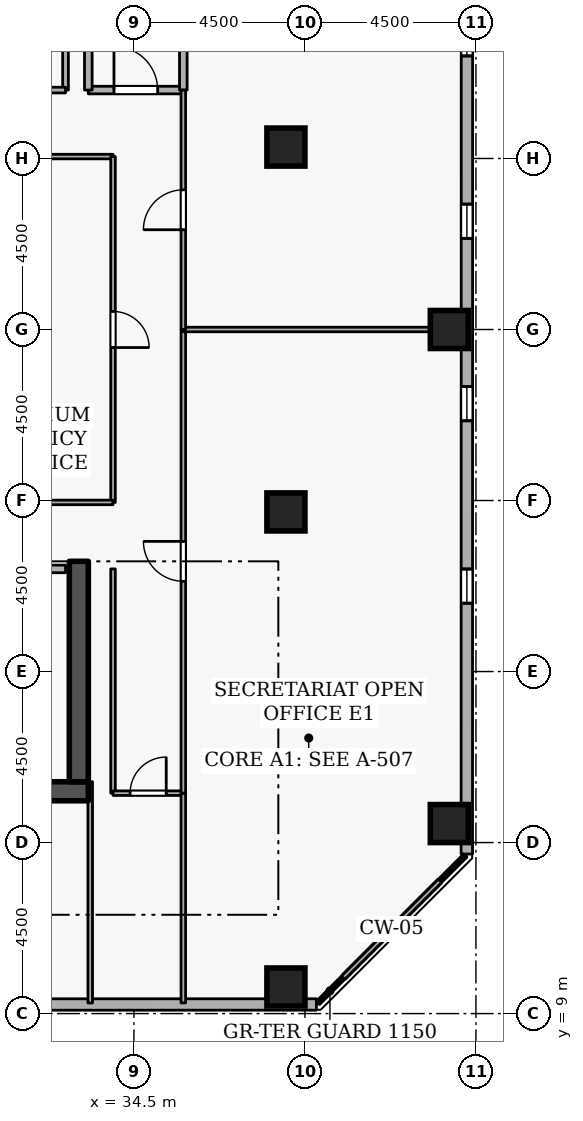
"""IFC4 building model, lengths in metres.
Left out: names, types, materials, properties, quantities, classifications, styles, units other than length and angle.
Written with IfcOpenShell. Run it as: python <this file> out.ifc"""

import sys

from ifc_helpers import new_model, si_unit, direction, frame, frame_2d, origin, origin_2d, place, context, subcontext, project, spatial, rectangle, extrude, element, fill, save


model = new_model("IFC4")
c1 = context("Model", 3, precision=1e-05, world=origin(), true_north=direction((0.0, 1.0)))
c2 = subcontext(c1, "Body", "Model", "MODEL_VIEW")
j1 = project(units=[si_unit("LENGTHUNIT", "METRE"), si_unit("PLANEANGLEUNIT", "RADIAN")], contexts=[c1])
p1 = place(None, origin())
s1 = spatial("IfcSite", under=j1, at=p1, CompositionType="ELEMENT")
p2 = place(p1, origin())
s2 = spatial("IfcBuilding", under=s1, at=p2, CompositionType="ELEMENT")
p3 = place(p2, frame((0.0, 0.0, 203.7)))
s3 = spatial("IfcBuildingStorey", under=s2, at=p3, CompositionType="ELEMENT", Elevation=203.7)
p4 = place(p3, frame((17.7, 14.85, 0.0), z_axis=(0.0, 0.0, 1.0), x_axis=(1.0, 0.0, 0.0)))
e1 = element("IfcWall", 1, at=p4, inside=s3, PredefinedType="SHEAR", context=c2, shape_type="SweptSolid", body=[
    extrude(rectangle(XDim=15.6, YDim=0.5, at=frame_2d((7.8, 0.0))), origin(), (0.0, 0.0, 1.0), 3.6),
])
p5 = place(p3, frame((33.05, 15.1, 0.0), z_axis=(0.0, 0.0, 1.0), x_axis=(0.0, 1.0, 0.0)))
e2 = element("IfcWall", 2, at=p5, inside=s3, PredefinedType="SHEAR", context=c2, shape_type="SweptSolid", body=[
    extrude(rectangle(XDim=5.8, YDim=0.5, at=frame_2d((2.9, 0.0))), origin(), (0.0, 0.0, 1.0), 3.6),
])
for number, where, z_axis, x_axis in (
    (3, (38.5, 9.7, 0.0), (0.0, 0.0, 1.0), (1.0, 0.0, 0.0)),
    (4, (42.8, 14.0, 0.0), (0.0, 0.0, 1.0), (1.0, 0.0, 0.0)),
    (5, (42.8, 27.0, 0.0), (0.0, 0.0, 1.0), (1.0, 0.0, 0.0)),
    (6, (38.5, 22.2, 0.0), (0.0, 0.0, 1.0), (1.0, 0.0, 0.0)),
    (7, (38.5, 31.8, 0.0), (0.0, 0.0, 1.0), (1.0, 0.0, 0.0)),
):
    element("IfcColumn", number, at=place(p3, frame(where, z_axis=z_axis, x_axis=x_axis)), inside=s3, PredefinedType="COLUMN", context=c2, shape_type="SweptSolid", body=[
        extrude(rectangle(XDim=1.0, YDim=1.0, at=origin_2d()), origin(), (0.0, 0.0, 1.0), 3.6),
    ])
p6 = place(p3, frame((4.319, 9.235, 0.0), z_axis=(0.0, 0.0, 1.0), x_axis=(0.999999991209, 0.000132597301, 0.0)))
e8 = element("IfcWall", 8, at=p6, inside=s3, PredefinedType="STANDARD", context=c2, shape_type="SweptSolid", body=[
    extrude(rectangle(XDim=34.983, YDim=0.3, at=frame_2d((17.492, 0.0))), origin(), (0.0, 0.0, 1.0), 2.7),
])
p7 = place(p6, frame((1.8, 0.0, 0.72)))
e9 = element("IfcOpeningElement", 9, at=p7, cuts=e8, PredefinedType="OPENING", context=c2, shape_type="SweptSolid", body=[
    extrude(rectangle(XDim=0.9, YDim=1.75, at=frame_2d((0.45, 0.875))), frame((0.0, 0.16, 0.0), z_axis=(0.0, -1.0, 0.0), x_axis=(1.0, 0.0, 0.0)), (0.0, 0.0, 1.0), 0.32),
])
p8 = place(p6, frame((11.4, 0.0, 0.72)))
e10 = element("IfcOpeningElement", 10, at=p8, cuts=e8, PredefinedType="OPENING", context=c2, shape_type="SweptSolid", body=[
    extrude(rectangle(XDim=0.9, YDim=1.75, at=frame_2d((0.45, 0.875))), frame((0.0, 0.16, 0.0), z_axis=(0.0, -1.0, 0.0), x_axis=(1.0, 0.0, 0.0)), (0.0, 0.0, 1.0), 0.32),
])
p9 = place(p6, frame((16.2, 0.0, 0.72)))
e11 = element("IfcOpeningElement", 11, at=p9, cuts=e8, PredefinedType="OPENING", context=c2, shape_type="SweptSolid", body=[
    extrude(rectangle(XDim=0.9, YDim=1.75, at=frame_2d((0.45, 0.875))), frame((0.0, 0.16, 0.0), z_axis=(0.0, -1.0, 0.0), x_axis=(1.0, 0.0, 0.0)), (0.0, 0.0, 1.0), 0.32),
])
p10 = place(p6, frame((25.8, 0.0, 0.72)))
e12 = element("IfcOpeningElement", 12, at=p10, cuts=e8, PredefinedType="OPENING", context=c2, shape_type="SweptSolid", body=[
    extrude(rectangle(XDim=0.9, YDim=1.75, at=frame_2d((0.45, 0.875))), frame((0.0, 0.16, 0.0), z_axis=(0.0, -1.0, 0.0), x_axis=(1.0, 0.0, 0.0)), (0.0, 0.0, 1.0), 0.32),
])
p11 = place(p3, frame((43.26, 13.198, 0.0), z_axis=(0.0, 0.0, 1.0), x_axis=(0.000132597301, 0.999999991209, 0.0)))
e13 = element("IfcWall", 13, at=p11, inside=s3, PredefinedType="STANDARD", context=c2, shape_type="SweptSolid", body=[
    extrude(rectangle(XDim=34.983, YDim=0.3, at=frame_2d((17.492, 0.0))), origin(), (0.0, 0.0, 1.0), 2.7),
])
p12 = place(p11, frame((6.6, 0.0, 0.72)))
e14 = element("IfcOpeningElement", 14, at=p12, cuts=e13, PredefinedType="OPENING", context=c2, shape_type="SweptSolid", body=[
    extrude(rectangle(XDim=0.9, YDim=1.75, at=frame_2d((0.45, 0.875))), frame((0.0, 0.16, 0.0), z_axis=(0.0, -1.0, 0.0), x_axis=(1.0, 0.0, 0.0)), (0.0, 0.0, 1.0), 0.32),
])
p13 = place(p11, frame((11.4, 0.0, 0.72)))
e15 = element("IfcOpeningElement", 15, at=p13, cuts=e13, PredefinedType="OPENING", context=c2, shape_type="SweptSolid", body=[
    extrude(rectangle(XDim=0.9, YDim=1.75, at=frame_2d((0.45, 0.875))), frame((0.0, 0.16, 0.0), z_axis=(0.0, -1.0, 0.0), x_axis=(1.0, 0.0, 0.0)), (0.0, 0.0, 1.0), 0.32),
])
p14 = place(p11, frame((16.2, 0.0, 0.72)))
e16 = element("IfcOpeningElement", 16, at=p14, cuts=e13, PredefinedType="OPENING", context=c2, shape_type="SweptSolid", body=[
    extrude(rectangle(XDim=0.9, YDim=1.75, at=frame_2d((0.45, 0.875))), frame((0.0, 0.16, 0.0), z_axis=(0.0, -1.0, 0.0), x_axis=(1.0, 0.0, 0.0)), (0.0, 0.0, 1.0), 0.32),
])
p15 = place(p11, frame((21.0, 0.0, 0.72)))
e17 = element("IfcOpeningElement", 17, at=p15, cuts=e13, PredefinedType="OPENING", context=c2, shape_type="SweptSolid", body=[
    extrude(rectangle(XDim=0.9, YDim=1.75, at=frame_2d((0.45, 0.875))), frame((0.0, 0.16, 0.0), z_axis=(0.0, -1.0, 0.0), x_axis=(1.0, 0.0, 0.0)), (0.0, 0.0, 1.0), 0.32),
])
p16 = place(p11, frame((30.6, 0.0, 0.72)))
e18 = element("IfcOpeningElement", 18, at=p16, cuts=e13, PredefinedType="OPENING", context=c2, shape_type="SweptSolid", body=[
    extrude(rectangle(XDim=0.9, YDim=1.75, at=frame_2d((0.45, 0.875))), frame((0.0, 0.16, 0.0), z_axis=(0.0, -1.0, 0.0), x_axis=(1.0, 0.0, 0.0)), (0.0, 0.0, 1.0), 0.32),
])
p17 = place(p3, frame((33.3, 33.3, 0.0), z_axis=(0.0, 0.0, 1.0), x_axis=(1.0, 0.0, 0.0)))
e19 = element("IfcWall", 19, at=p17, inside=s3, PredefinedType="STANDARD", context=c2, shape_type="SweptSolid", body=[
    extrude(rectangle(XDim=2.5, YDim=0.2, at=frame_2d((1.25, 0.0))), origin(), (0.0, 0.0, 1.0), 3.34),
])
p18 = place(p17, frame((0.675, 0.0, 0.0)))
e20 = element("IfcOpeningElement", 20, at=p18, cuts=e19, PredefinedType="OPENING", context=c2, shape_type="SweptSolid", body=[
    extrude(rectangle(XDim=1.15, YDim=2.1, at=frame_2d((0.575, 1.05))), frame((0.0, 0.11, 0.0), z_axis=(0.0, -1.0, 0.0), x_axis=(1.0, 0.0, 0.0)), (0.0, 0.0, 1.0), 0.22),
])
p19 = place(p3, frame((35.8, 33.3, 0.0), z_axis=(0.0, 0.0, 1.0), x_axis=(0.0, 1.0, 0.0)))
e21 = element("IfcWall", 21, at=p19, inside=s3, PredefinedType="STANDARD", context=c2, shape_type="SweptSolid", body=[
    extrude(rectangle(XDim=5.7, YDim=0.2, at=frame_2d((2.85, 0.0))), origin(), (0.0, 0.0, 1.0), 3.34),
])
p20 = place(p3, frame((33.3, 35.6, 0.0), z_axis=(0.0, 0.0, 1.0), x_axis=(0.0, -1.0, 0.0)))
e22 = element("IfcWall", 22, at=p20, inside=s3, PredefinedType="STANDARD", context=c2, shape_type="SweptSolid", body=[
    extrude(rectangle(XDim=2.3, YDim=0.2, at=frame_2d((1.15, 0.0))), origin(), (0.0, 0.0, 1.0), 2.545),
])
p21 = place(p3, frame((30.5, 20.7, 0.0), z_axis=(0.0, 0.0, 1.0), x_axis=(1.0, 0.0, 0.0)))
e23 = element("IfcWall", 23, at=p21, inside=s3, PredefinedType="STANDARD", context=c2, shape_type="SweptSolid", body=[
    extrude(rectangle(XDim=2.2, YDim=0.2, at=frame_2d((1.1, 0.0))), origin(), (0.0, 0.0, 1.0), 3.34),
])
p22 = place(p21, frame((0.525, 0.0, 0.0)))
e24 = element("IfcOpeningElement", 24, at=p22, cuts=e23, PredefinedType="OPENING", context=c2, shape_type="SweptSolid", body=[
    extrude(rectangle(XDim=1.15, YDim=2.1, at=frame_2d((0.575, 1.05))), frame((0.0, 0.11, 0.0), z_axis=(0.0, -1.0, 0.0), x_axis=(1.0, 0.0, 0.0)), (0.0, 0.0, 1.0), 0.22),
])
p23 = place(p3, frame((32.7, 35.35, 0.0), z_axis=(0.0, 0.0, 1.0), x_axis=(0.0, -1.0, 0.0)))
e25 = element("IfcWall", 25, at=p23, inside=s3, PredefinedType="PARTITIONING", context=c2, shape_type="SweptSolid", body=[
    extrude(rectangle(XDim=2.05, YDim=0.15, at=frame_2d((1.025, 0.0))), origin(), (0.0, 0.0, 1.0), 2.545),
])
p24 = place(p3, frame((32.7, 33.3, 0.0), z_axis=(0.0, 0.0, 1.0), x_axis=(-1.0, 0.0, 0.0)))
e26 = element("IfcWall", 26, at=p24, inside=s3, PredefinedType="PARTITIONING", context=c2, shape_type="SweptSolid", body=[
    extrude(rectangle(XDim=2.35, YDim=0.15, at=frame_2d((1.175, 0.0))), origin(), (0.0, 0.0, 1.0), 3.34),
])
p25 = place(p24, frame((0.715, 0.0, 0.0)))
e27 = element("IfcOpeningElement", 27, at=p25, cuts=e26, PredefinedType="OPENING", context=c2, shape_type="SweptSolid", body=[
    extrude(rectangle(XDim=0.92, YDim=2.08, at=frame_2d((0.46, 1.04))), frame((0.0, 0.085, 0.0), z_axis=(0.0, -1.0, 0.0), x_axis=(1.0, 0.0, 0.0)), (0.0, 0.0, 1.0), 0.17),
])
p26 = place(p3, frame((33.95, 20.7, 0.0), z_axis=(0.0, 0.0, 1.0), x_axis=(0.0, -1.0, 0.0)))
e28 = element("IfcWall", 28, at=p26, inside=s3, PredefinedType="PARTITIONING", context=c2, shape_type="SweptSolid", body=[
    extrude(rectangle(XDim=5.9, YDim=0.12, at=frame_2d((2.95, 0.0))), origin(), (0.0, 0.0, 1.0), 3.34),
])
p27 = place(p3, frame((33.95, 14.8, 0.0), z_axis=(0.0, 0.0, 1.0), x_axis=(1.0, 0.0, 0.0)))
e29 = element("IfcWall", 29, at=p27, inside=s3, PredefinedType="PARTITIONING", context=c2, shape_type="SweptSolid", body=[
    extrude(rectangle(XDim=1.85, YDim=0.12, at=frame_2d((0.925, 0.0))), origin(), (0.0, 0.0, 1.0), 3.34),
])
p28 = place(p27, frame((0.45, 0.0, 0.0)))
e30 = element("IfcOpeningElement", 30, at=p28, cuts=e29, PredefinedType="OPENING", context=c2, shape_type="SweptSolid", body=[
    extrude(rectangle(XDim=0.95, YDim=2.1, at=frame_2d((0.475, 1.05))), frame((0.0, 0.07, 0.0), z_axis=(0.0, -1.0, 0.0), x_axis=(1.0, 0.0, 0.0)), (0.0, 0.0, 1.0), 0.14),
])
p29 = place(p3, frame((35.8, 14.8, 0.0), z_axis=(0.0, 0.0, 1.0), x_axis=(0.0, -1.0, 0.0)))
e31 = element("IfcWall", 31, at=p29, inside=s3, PredefinedType="PARTITIONING", context=c2, shape_type="SweptSolid", body=[
    extrude(rectangle(XDim=5.52, YDim=0.12, at=frame_2d((2.76, 0.0))), origin(), (0.0, 0.0, 1.0), 3.34),
])
p30 = place(p3, frame((33.35, 9.28, 0.0), z_axis=(0.0, 0.0, 1.0), x_axis=(0.0, 1.0, 0.0)))
e32 = element("IfcWall", 32, at=p30, inside=s3, PredefinedType="PARTITIONING", context=c2, shape_type="SweptSolid", body=[
    extrude(rectangle(XDim=5.82, YDim=0.12, at=frame_2d((2.91, 0.0))), origin(), (0.0, 0.0, 1.0), 2.545),
])
p31 = place(p3, frame((35.8, 14.8, 0.0), z_axis=(0.0, 0.0, 1.0), x_axis=(0.0, 1.0, 0.0)))
e33 = element("IfcWall", 33, at=p31, inside=s3, PredefinedType="PARTITIONING", context=c2, shape_type="SweptSolid", body=[
    extrude(rectangle(XDim=12.2, YDim=0.12, at=frame_2d((6.1, 0.0))), origin(), (0.0, 0.0, 1.0), 3.34),
])
p32 = place(p31, frame((5.575, 0.0, 0.0)))
e34 = element("IfcOpeningElement", 34, at=p32, cuts=e33, PredefinedType="OPENING", context=c2, shape_type="SweptSolid", body=[
    extrude(rectangle(XDim=1.05, YDim=2.1, at=frame_2d((0.525, 1.05))), frame((0.0, 0.07, 0.0), z_axis=(0.0, -1.0, 0.0), x_axis=(1.0, 0.0, 0.0)), (0.0, 0.0, 1.0), 0.14),
])
p33 = place(p3, frame((35.8, 27.0, 0.0), z_axis=(0.0, 0.0, 1.0), x_axis=(1.0, 0.0, 0.0)))
e35 = element("IfcWall", 35, at=p33, inside=s3, PredefinedType="PARTITIONING", context=c2, shape_type="SweptSolid", body=[
    extrude(rectangle(XDim=7.42, YDim=0.12, at=frame_2d((3.71, 0.0))), origin(), (0.0, 0.0, 1.0), 2.932),
])
p34 = place(p3, frame((43.22, 13.16, 0.0), z_axis=(0.0, 0.0, 1.0), x_axis=(-0.707106781187, -0.707106781187, 0.0)))
e36 = element("IfcWall", 36, at=p34, inside=s3, PredefinedType="PARTITIONING", context=c2, shape_type="SweptSolid", body=[
    extrude(rectangle(XDim=5.487, YDim=0.12, at=frame_2d((2.743, 0.0))), origin(), (0.0, 0.0, 1.0), 3.34),
])
p35 = place(p3, frame((35.8, 27.0, 0.0), z_axis=(0.0, 0.0, 1.0), x_axis=(0.0, 1.0, 0.0)))
e37 = element("IfcWall", 37, at=p35, inside=s3, PredefinedType="PARTITIONING", context=c2, shape_type="SweptSolid", body=[
    extrude(rectangle(XDim=6.3, YDim=0.12, at=frame_2d((3.15, 0.0))), origin(), (0.0, 0.0, 1.0), 3.34),
])
p36 = place(p35, frame((2.625, 0.0, 0.0)))
e38 = element("IfcOpeningElement", 38, at=p36, cuts=e37, PredefinedType="OPENING", context=c2, shape_type="SweptSolid", body=[
    extrude(rectangle(XDim=1.05, YDim=2.1, at=frame_2d((0.525, 1.05))), frame((0.0, 0.07, 0.0), z_axis=(0.0, -1.0, 0.0), x_axis=(1.0, 0.0, 0.0)), (0.0, 0.0, 1.0), 0.14),
])
p37 = place(p3, frame((30.7, 31.55, 0.0), z_axis=(0.0, 0.0, 1.0), x_axis=(1.0, 0.0, 0.0)))
e39 = element("IfcWall", 39, at=p37, inside=s3, PredefinedType="PARTITIONING", context=c2, shape_type="SweptSolid", body=[
    extrude(rectangle(XDim=3.25, YDim=0.12, at=frame_2d((1.625, 0.0))), origin(), (0.0, 0.0, 1.0), 3.34),
])
p38 = place(p3, frame((33.95, 31.55, 0.0), z_axis=(0.0, 0.0, 1.0), x_axis=(0.0, -1.0, 0.0)))
e40 = element("IfcWall", 40, at=p38, inside=s3, PredefinedType="PARTITIONING", context=c2, shape_type="SweptSolid", body=[
    extrude(rectangle(XDim=9.1, YDim=0.12, at=frame_2d((4.55, 0.0))), origin(), (0.0, 0.0, 1.0), 3.34),
])
p39 = place(p38, frame((4.075, 0.0, 0.0)))
e41 = element("IfcOpeningElement", 41, at=p39, cuts=e40, PredefinedType="OPENING", context=c2, shape_type="SweptSolid", body=[
    extrude(rectangle(XDim=0.95, YDim=2.1, at=frame_2d((0.475, 1.05))), frame((0.0, 0.07, 0.0), z_axis=(0.0, -1.0, 0.0), x_axis=(1.0, 0.0, 0.0)), (0.0, 0.0, 1.0), 0.14),
])
p40 = place(p3, frame((33.95, 22.45, 0.0), z_axis=(0.0, 0.0, 1.0), x_axis=(-1.0, 0.0, 0.0)))
e42 = element("IfcWall", 42, at=p40, inside=s3, PredefinedType="PARTITIONING", context=c2, shape_type="SweptSolid", body=[
    extrude(rectangle(XDim=3.25, YDim=0.12, at=frame_2d((1.625, 0.0))), origin(), (0.0, 0.0, 1.0), 3.34),
])
p41 = place(p12, origin())
e43 = element("IfcWindow", 43, at=p41, inside=s3, PartitioningType="SINGLE_PANEL", PredefinedType="WINDOW", context=c2, shape_type="SweptSolid", body=[
    extrude(rectangle(XDim=0.9, YDim=1.75, at=frame_2d((0.45, 0.875))), frame((0.0, 0.03, 0.0), z_axis=(0.0, -1.0, 0.0), x_axis=(1.0, 0.0, 0.0)), (0.0, 0.0, 1.0), 0.06),
])
fill(e14, e43)
p42 = place(p13, origin())
e44 = element("IfcWindow", 44, at=p42, inside=s3, PartitioningType="SINGLE_PANEL", PredefinedType="WINDOW", context=c2, shape_type="SweptSolid", body=[
    extrude(rectangle(XDim=0.9, YDim=1.75, at=frame_2d((0.45, 0.875))), frame((0.0, 0.03, 0.0), z_axis=(0.0, -1.0, 0.0), x_axis=(1.0, 0.0, 0.0)), (0.0, 0.0, 1.0), 0.06),
])
fill(e15, e44)
p43 = place(p14, origin())
e45 = element("IfcWindow", 45, at=p43, inside=s3, PartitioningType="SINGLE_PANEL", PredefinedType="WINDOW", context=c2, shape_type="SweptSolid", body=[
    extrude(rectangle(XDim=0.9, YDim=1.75, at=frame_2d((0.45, 0.875))), frame((0.0, 0.03, 0.0), z_axis=(0.0, -1.0, 0.0), x_axis=(1.0, 0.0, 0.0)), (0.0, 0.0, 1.0), 0.06),
])
fill(e16, e45)
p44 = place(p15, origin())
e46 = element("IfcWindow", 46, at=p44, inside=s3, PartitioningType="SINGLE_PANEL", PredefinedType="WINDOW", context=c2, shape_type="SweptSolid", body=[
    extrude(rectangle(XDim=0.9, YDim=1.75, at=frame_2d((0.45, 0.875))), frame((0.0, 0.03, 0.0), z_axis=(0.0, -1.0, 0.0), x_axis=(1.0, 0.0, 0.0)), (0.0, 0.0, 1.0), 0.06),
])
fill(e17, e46)
p45 = place(p18, origin())
e47 = element("IfcDoor", 47, at=p45, inside=s3, OperationType="SINGLE_SWING_LEFT", PredefinedType="DOOR", context=c2, shape_type="SweptSolid", body=[
    extrude(rectangle(XDim=1.15, YDim=2.1, at=frame_2d((0.575, 1.05))), frame((0.0, 0.025, 0.0), z_axis=(0.0, -1.0, 0.0), x_axis=(1.0, 0.0, 0.0)), (0.0, 0.0, 1.0), 0.05),
])
fill(e20, e47)
p46 = place(p28, origin())
e48 = element("IfcDoor", 48, at=p46, inside=s3, OperationType="SINGLE_SWING_RIGHT", PredefinedType="DOOR", context=c2, shape_type="SweptSolid", body=[
    extrude(rectangle(XDim=0.95, YDim=2.1, at=frame_2d((0.475, 1.05))), frame((0.0, 0.025, 0.0), z_axis=(0.0, -1.0, 0.0), x_axis=(1.0, 0.0, 0.0)), (0.0, 0.0, 1.0), 0.05),
])
fill(e30, e48)
p47 = place(p32, origin())
e49 = element("IfcDoor", 49, at=p47, inside=s3, OperationType="SINGLE_SWING_RIGHT", PredefinedType="DOOR", context=c2, shape_type="SweptSolid", body=[
    extrude(rectangle(XDim=1.05, YDim=2.1, at=frame_2d((0.525, 1.05))), frame((0.0, 0.025, 0.0), z_axis=(0.0, -1.0, 0.0), x_axis=(1.0, 0.0, 0.0)), (0.0, 0.0, 1.0), 0.05),
])
fill(e34, e49)
p48 = place(p36, origin())
e50 = element("IfcDoor", 50, at=p48, inside=s3, OperationType="SINGLE_SWING_LEFT", PredefinedType="DOOR", context=c2, shape_type="SweptSolid", body=[
    extrude(rectangle(XDim=1.05, YDim=2.1, at=frame_2d((0.525, 1.05))), frame((0.0, 0.025, 0.0), z_axis=(0.0, -1.0, 0.0), x_axis=(1.0, 0.0, 0.0)), (0.0, 0.0, 1.0), 0.05),
])
fill(e38, e50)
p49 = place(p39, origin())
e51 = element("IfcDoor", 51, at=p49, inside=s3, OperationType="SINGLE_SWING_RIGHT", PredefinedType="DOOR", context=c2, shape_type="SweptSolid", body=[
    extrude(rectangle(XDim=0.95, YDim=2.1, at=frame_2d((0.475, 1.05))), frame((0.0, 0.025, 0.0), z_axis=(0.0, -1.0, 0.0), x_axis=(1.0, 0.0, 0.0)), (0.0, 0.0, 1.0), 0.05),
])
fill(e41, e51)
save(model, sys.argv[1])
